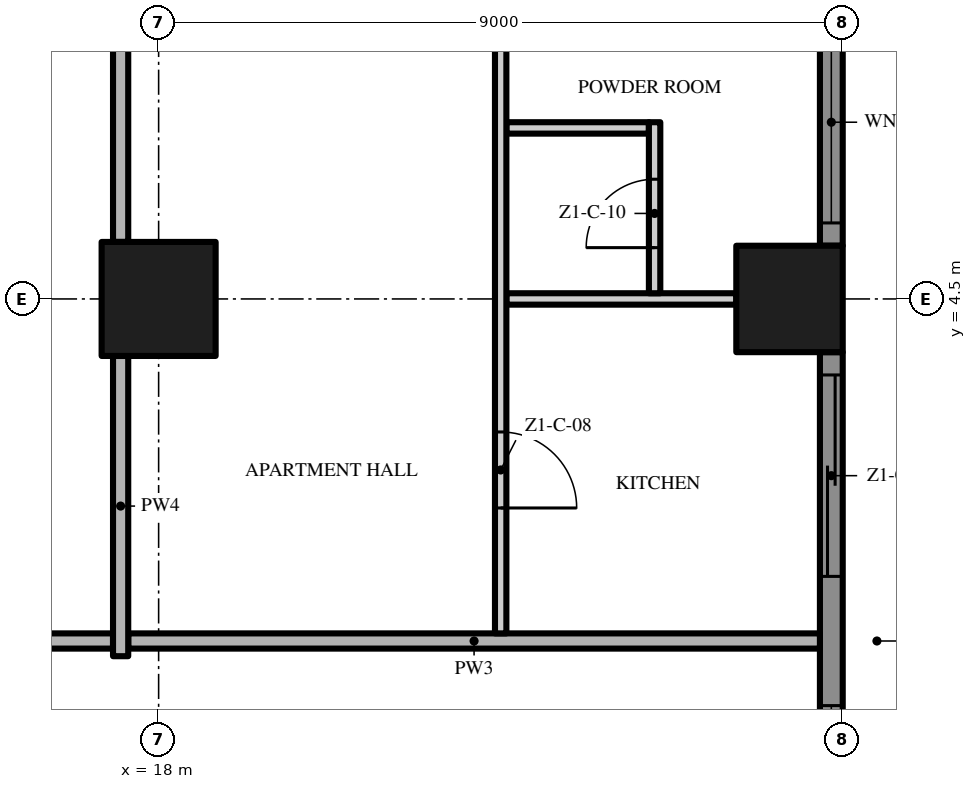
"""IFC4 building model, lengths in metres.
Left out: names, types, materials, properties, quantities, classifications, styles, units other than length and angle.
Written with IfcOpenShell. Run it as: python <this file> out.ifc"""

import sys

from ifc_helpers import new_model, si_unit, direction, frame, frame_2d, origin, origin_2d, place, context, subcontext, project, spatial, polyline, rectangle, outline, extrude, element, fill, save


model = new_model("IFC4")
c1 = context("Model", 3, precision=1e-05, world=origin(), true_north=direction((0.0, 1.0)))
c2 = subcontext(c1, "Body", "Model", "MODEL_VIEW")
j1 = project(units=[si_unit("LENGTHUNIT", "METRE"), si_unit("PLANEANGLEUNIT", "RADIAN")], contexts=[c1])
p1 = place(None, origin())
s1 = spatial("IfcSite", under=j1, at=p1, CompositionType="ELEMENT")
p2 = place(p1, origin())
s2 = spatial("IfcBuilding", under=s1, at=p2, CompositionType="ELEMENT")
p3 = place(p2, frame((0.0, 0.0, 41.6)))
s3 = spatial("IfcBuildingStorey", under=s2, at=p3, CompositionType="ELEMENT", Elevation=41.6)
p4 = place(p3, frame((18.0, 4.5, 0.0), z_axis=(0.0, 0.0, 1.0), x_axis=(1.0, 0.0, 0.0)))
e1 = element("IfcColumn", 1, at=p4, inside=s3, PredefinedType="COLUMN", context=c2, shape_type="SweptSolid", body=[
    extrude(rectangle(XDim=1.5, YDim=1.5, at=origin_2d()), origin(), (0.0, 0.0, 1.0), 3.5),
])
p5 = place(p3, frame((26.3, 4.5, 0.0), z_axis=(0.0, 0.0, 1.0), x_axis=(1.0, 0.0, 0.0)))
e2 = element("IfcColumn", 2, at=p5, inside=s3, PredefinedType="COLUMN", context=c2, shape_type="SweptSolid", body=[
    extrude(rectangle(XDim=1.4, YDim=1.4, at=origin_2d()), origin(), (0.0, 0.0, 1.0), 3.5),
])
p6 = place(p3, frame((26.85, 3.8, 0.0), z_axis=(0.0, 0.0, 1.0), x_axis=(0.0, -1.0, 0.0)))
e3 = element("IfcWall", 3, at=p6, inside=s3, PredefinedType="SOLIDWALL", context=c2, shape_type="SweptSolid", body=[
    extrude(rectangle(XDim=7.6, YDim=0.3, at=frame_2d((3.8, 0.0))), origin(), (0.0, 0.0, 1.0), 3.5),
])
p7 = place(p6, frame((4.65, 0.0, 0.45)))
e4 = element("IfcOpeningElement", 4, at=p7, cuts=e3, PredefinedType="OPENING", context=c2, shape_type="SweptSolid", body=[
    extrude(rectangle(XDim=2.65, YDim=2.65, at=frame_2d((1.325, 1.325))), frame((0.0, 0.16, 0.0), z_axis=(0.0, -1.0, 0.0), x_axis=(1.0, 0.0, 0.0)), (0.0, 0.0, 1.0), 0.32),
])
p8 = place(p6, frame((0.3, 0.0, 0.0)))
e5 = element("IfcOpeningElement", 5, at=p8, cuts=e3, PredefinedType="OPENING", context=c2, shape_type="SweptSolid", body=[
    extrude(rectangle(XDim=2.65, YDim=2.4, at=frame_2d((1.325, 1.2))), frame((0.0, 0.16, 0.0), z_axis=(0.0, -1.0, 0.0), x_axis=(1.0, 0.0, 0.0)), (0.0, 0.0, 1.0), 0.32),
])
p9 = place(p3, frame((26.85, 12.8, 0.0), z_axis=(0.0, 0.0, 1.0), x_axis=(0.0, -1.0, 0.0)))
e6 = element("IfcWall", 6, at=p9, inside=s3, PredefinedType="SOLIDWALL", context=c2, shape_type="SweptSolid", body=[
    extrude(rectangle(XDim=7.6, YDim=0.3, at=frame_2d((3.8, 0.0))), origin(), (0.0, 0.0, 1.0), 3.5),
])
p10 = place(p9, frame((4.65, 0.0, 0.45)))
e7 = element("IfcOpeningElement", 7, at=p10, cuts=e6, PredefinedType="OPENING", context=c2, shape_type="SweptSolid", body=[
    extrude(rectangle(XDim=2.65, YDim=2.65, at=frame_2d((1.325, 1.325))), frame((0.0, 0.16, 0.0), z_axis=(0.0, -1.0, 0.0), x_axis=(1.0, 0.0, 0.0)), (0.0, 0.0, 1.0), 0.32),
])
p11 = place(p9, frame((0.3, 0.0, 0.45)))
e8 = element("IfcOpeningElement", 8, at=p11, cuts=e6, PredefinedType="OPENING", context=c2, shape_type="SweptSolid", body=[
    extrude(rectangle(XDim=2.65, YDim=2.65, at=frame_2d((1.325, 1.325))), frame((0.0, 0.16, 0.0), z_axis=(0.0, -1.0, 0.0), x_axis=(1.0, 0.0, 0.0)), (0.0, 0.0, 1.0), 0.32),
])
p12 = place(p3, origin())
e9 = element("IfcWall", 9, at=p12, inside=s3, PredefinedType="USERDEFINED", context=c2, shape_type="SweptSolid", body=[
    extrude(outline(polyline([(27.951, -18.0), (28.612, -16.5), (29.345, -15.0), (29.869, -13.5), (30.0, -12.375), (29.985, -12.0), (29.649, -10.5), (28.988, -9.0), (28.255, -7.5), (27.731, -6.0), (27.6, -4.875), (27.615, -4.5), (27.951, -3.0), (28.612, -1.5), (29.345, 0.0), (29.869, 1.5), (30.0, 2.625), (29.985, 3.0), (29.649, 4.5), (28.988, 6.0), (28.255, 7.5), (27.731, 9.0), (27.6, 10.125), (27.615, 10.5), (27.951, 12.0), (28.612, 13.5), (29.345, 15.0), (29.869, 16.5), (30.0, 17.625), (29.985, 18.0), (29.735, 17.99), (29.749, 17.635), (29.624, 16.556), (29.114, 15.096), (28.385, 13.605), (27.713, 12.079), (27.366, 10.533), (27.349, 10.115), (27.486, 8.944), (28.024, 7.404), (28.761, 5.895), (29.41, 4.421), (29.736, 2.967), (29.749, 2.635), (29.624, 1.556), (29.114, 0.096), (28.385, -1.395), (27.713, -2.921), (27.366, -4.467), (27.349, -4.885), (27.486, -6.056), (28.024, -7.596), (28.761, -9.105), (29.41, -10.579), (29.736, -12.033), (29.749, -12.365), (29.624, -13.444), (29.114, -14.904), (28.385, -16.395), (27.723, -17.899), (27.951, -18.0)])), origin(), (0.0, 0.0, 1.0), 0.9),
])
p13 = place(p3, frame((17.4, 0.0, 0.0), z_axis=(0.0, 0.0, 1.0), x_axis=(-1.0, 0.0, 0.0)))
e10 = element("IfcWall", 10, at=p13, inside=s3, PredefinedType="PARTITIONING", context=c2, shape_type="SweptSolid", body=[
    extrude(rectangle(XDim=17.3, YDim=0.2, at=frame_2d((8.65, 0.0))), origin(), (0.0, 0.0, 1.0), 3.5),
])
p14 = place(p13, frame((7.65, 0.0, 0.0)))
e11 = element("IfcOpeningElement", 11, at=p14, cuts=e10, PredefinedType="OPENING", context=c2, shape_type="SweptSolid", body=[
    extrude(rectangle(XDim=1.5, YDim=2.4, at=frame_2d((0.75, 1.2))), frame((0.0, 0.11, 0.0), z_axis=(0.0, -1.0, 0.0), x_axis=(1.0, 0.0, 0.0)), (0.0, 0.0, 1.0), 0.22),
])
p15 = place(p3, frame((17.6, 0.0, 0.0), z_axis=(0.0, 0.0, 1.0), x_axis=(1.0, 0.0, 0.0)))
e12 = element("IfcWall", 12, at=p15, inside=s3, PredefinedType="PARTITIONING", context=c2, shape_type="SweptSolid", body=[
    extrude(rectangle(XDim=9.1, YDim=0.2, at=frame_2d((4.55, 0.0))), origin(), (0.0, 0.0, 1.0), 3.5),
])
p16 = place(p3, frame((22.575, 4.5, 0.0), z_axis=(0.0, 0.0, 1.0), x_axis=(1.0, 0.0, 0.0)))
e13 = element("IfcWall", 13, at=p16, inside=s3, PredefinedType="PARTITIONING", context=c2, shape_type="SweptSolid", body=[
    extrude(rectangle(XDim=3.025, YDim=0.15, at=frame_2d((1.512, 0.0))), origin(), (0.0, 0.0, 1.0), 3.5),
])
p17 = place(p3, frame((22.575, 6.75, 0.0), z_axis=(0.0, 0.0, 1.0), x_axis=(1.0, 0.0, 0.0)))
e14 = element("IfcWall", 14, at=p17, inside=s3, PredefinedType="PARTITIONING", context=c2, shape_type="SweptSolid", body=[
    extrude(rectangle(XDim=1.875, YDim=0.15, at=frame_2d((0.938, 0.0))), origin(), (0.0, 0.0, 1.0), 3.5),
])
p18 = place(p3, frame((17.5, -0.2, 0.0), z_axis=(0.0, 0.0, 1.0), x_axis=(0.0, 1.0, 0.0)))
e15 = element("IfcWall", 15, at=p18, inside=s3, PredefinedType="PARTITIONING", context=c2, shape_type="SweptSolid", body=[
    extrude(rectangle(XDim=3.95, YDim=0.2, at=frame_2d((1.975, 0.0))), origin(), (0.0, 0.0, 1.0), 3.5),
])
p19 = place(p3, frame((17.5, 12.75, 0.0), z_axis=(0.0, 0.0, 1.0), x_axis=(0.0, -1.0, 0.0)))
e16 = element("IfcWall", 16, at=p19, inside=s3, PredefinedType="PARTITIONING", context=c2, shape_type="SweptSolid", body=[
    extrude(rectangle(XDim=7.5, YDim=0.2, at=frame_2d((3.75, 0.0))), origin(), (0.0, 0.0, 1.0), 3.5),
])
p20 = place(p19, frame((3.15, 0.0, 0.0)))
e17 = element("IfcOpeningElement", 17, at=p20, cuts=e16, PredefinedType="OPENING", context=c2, shape_type="SweptSolid", body=[
    extrude(rectangle(XDim=1.2, YDim=2.4, at=frame_2d((0.6, 1.2))), frame((0.0, 0.11, 0.0), z_axis=(0.0, -1.0, 0.0), x_axis=(1.0, 0.0, 0.0)), (0.0, 0.0, 1.0), 0.22),
])
p21 = place(p3, frame((22.5, 17.3, 0.0), z_axis=(0.0, 0.0, 1.0), x_axis=(0.0, -1.0, 0.0)))
e18 = element("IfcWall", 18, at=p21, inside=s3, PredefinedType="PARTITIONING", context=c2, shape_type="SweptSolid", body=[
    extrude(rectangle(XDim=17.2, YDim=0.15, at=frame_2d((8.6, 0.0))), origin(), (0.0, 0.0, 1.0), 3.5),
])
p22 = place(p21, frame((14.55, 0.0, 0.0)))
e19 = element("IfcOpeningElement", 19, at=p22, cuts=e18, PredefinedType="OPENING", context=c2, shape_type="SweptSolid", body=[
    extrude(rectangle(XDim=1.0, YDim=2.4, at=frame_2d((0.5, 1.2))), frame((0.0, 0.085, 0.0), z_axis=(0.0, -1.0, 0.0), x_axis=(1.0, 0.0, 0.0)), (0.0, 0.0, 1.0), 0.17),
])
p23 = place(p21, frame((7.4, 0.0, 0.0)))
e20 = element("IfcOpeningElement", 20, at=p23, cuts=e18, PredefinedType="OPENING", context=c2, shape_type="SweptSolid", body=[
    extrude(rectangle(XDim=1.8, YDim=2.4, at=frame_2d((0.9, 1.2))), frame((0.0, 0.085, 0.0), z_axis=(0.0, -1.0, 0.0), x_axis=(1.0, 0.0, 0.0)), (0.0, 0.0, 1.0), 0.17),
])
p24 = place(p21, frame((0.15, 0.0, 0.0)))
e21 = element("IfcOpeningElement", 21, at=p24, cuts=e18, PredefinedType="OPENING", context=c2, shape_type="SweptSolid", body=[
    extrude(rectangle(XDim=1.0, YDim=2.4, at=frame_2d((0.5, 1.2))), frame((0.0, 0.085, 0.0), z_axis=(0.0, -1.0, 0.0), x_axis=(1.0, 0.0, 0.0)), (0.0, 0.0, 1.0), 0.17),
])
p25 = place(p3, frame((24.525, 4.575, 0.0), z_axis=(0.0, 0.0, 1.0), x_axis=(0.0, 1.0, 0.0)))
e22 = element("IfcWall", 22, at=p25, inside=s3, PredefinedType="PARTITIONING", context=c2, shape_type="SweptSolid", body=[
    extrude(rectangle(XDim=2.25, YDim=0.15, at=frame_2d((1.125, 0.0))), origin(), (0.0, 0.0, 1.0), 3.5),
])
p26 = place(p25, frame((0.6, 0.0, 0.0)))
e23 = element("IfcOpeningElement", 23, at=p26, cuts=e22, PredefinedType="OPENING", context=c2, shape_type="SweptSolid", body=[
    extrude(rectangle(XDim=0.9, YDim=2.1, at=frame_2d((0.45, 1.05))), frame((0.0, 0.085, 0.0), z_axis=(0.0, -1.0, 0.0), x_axis=(1.0, 0.0, 0.0)), (0.0, 0.0, 1.0), 0.17),
])
p27 = place(p7, origin())
e24 = element("IfcWindow", 24, at=p27, inside=s3, PartitioningType="SINGLE_PANEL", PredefinedType="WINDOW", context=c2, shape_type="SweptSolid", body=[
    extrude(rectangle(XDim=2.65, YDim=2.65, at=frame_2d((1.325, 1.325))), frame((0.0, 0.03, 0.0), z_axis=(0.0, -1.0, 0.0), x_axis=(1.0, 0.0, 0.0)), (0.0, 0.0, 1.0), 0.06),
])
fill(e4, e24)
p28 = place(p8, origin())
e25 = element("IfcDoor", 25, at=p28, inside=s3, OperationType="SINGLE_SWING_LEFT", PredefinedType="DOOR", context=c2, shape_type="SweptSolid", body=[
    extrude(rectangle(XDim=2.65, YDim=2.4, at=frame_2d((1.325, 1.2))), frame((0.0, 0.025, 0.0), z_axis=(0.0, -1.0, 0.0), x_axis=(1.0, 0.0, 0.0)), (0.0, 0.0, 1.0), 0.05),
])
fill(e5, e25)
p29 = place(p10, origin())
e26 = element("IfcWindow", 26, at=p29, inside=s3, PartitioningType="SINGLE_PANEL", PredefinedType="WINDOW", context=c2, shape_type="SweptSolid", body=[
    extrude(rectangle(XDim=2.65, YDim=2.65, at=frame_2d((1.325, 1.325))), frame((0.0, 0.03, 0.0), z_axis=(0.0, -1.0, 0.0), x_axis=(1.0, 0.0, 0.0)), (0.0, 0.0, 1.0), 0.06),
])
fill(e7, e26)
p30 = place(p22, origin())
e27 = element("IfcDoor", 27, at=p30, inside=s3, OperationType="SINGLE_SWING_RIGHT", PredefinedType="DOOR", context=c2, shape_type="SweptSolid", body=[
    extrude(rectangle(XDim=1.0, YDim=2.4, at=frame_2d((0.5, 1.2))), frame((0.0, 0.025, 0.0), z_axis=(0.0, -1.0, 0.0), x_axis=(1.0, 0.0, 0.0)), (0.0, 0.0, 1.0), 0.05),
])
fill(e19, e27)
p31 = place(p26, origin())
e28 = element("IfcDoor", 28, at=p31, inside=s3, OperationType="SINGLE_SWING_LEFT", PredefinedType="DOOR", context=c2, shape_type="SweptSolid", body=[
    extrude(rectangle(XDim=0.9, YDim=2.1, at=frame_2d((0.45, 1.05))), frame((0.0, 0.025, 0.0), z_axis=(0.0, -1.0, 0.0), x_axis=(1.0, 0.0, 0.0)), (0.0, 0.0, 1.0), 0.05),
])
fill(e23, e28)
save(model, sys.argv[1])
